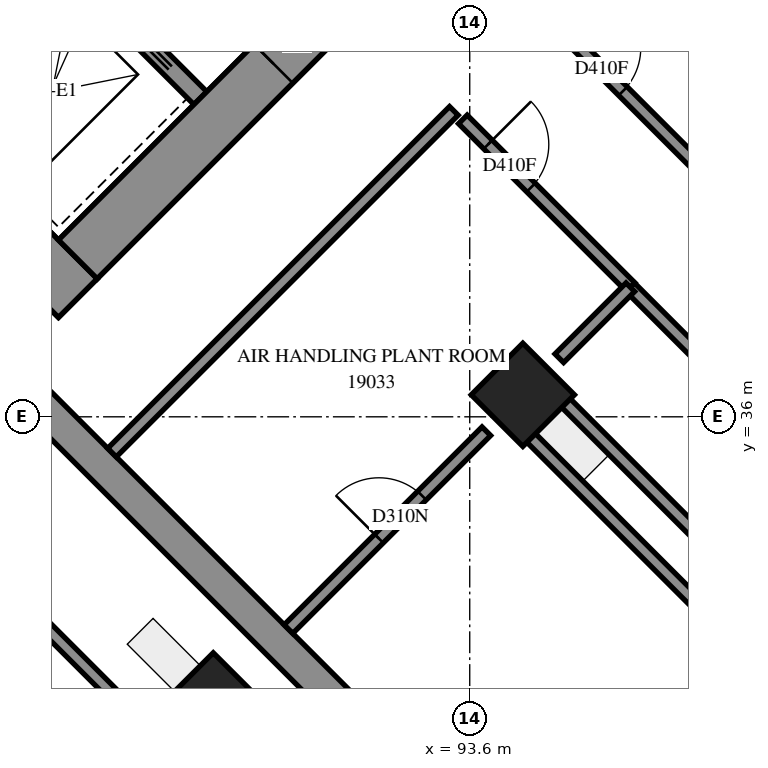
"""IFC4 building model, lengths in metres.
Left out: names, types, materials, properties, quantities, classifications, styles, units other than length and angle.
Written with IfcOpenShell. Run it as: python <this file> out.ifc"""

import sys

from ifc_helpers import new_model, si_unit, direction, frame, frame_2d, origin, origin_2d, place, context, subcontext, project, spatial, polyline, rectangle, outline, extrude, element, fill, save


model = new_model("IFC4")
c1 = context("Model", 3, precision=1e-05, world=origin(), true_north=direction((0.0, 1.0)))
c2 = subcontext(c1, "Body", "Model", "MODEL_VIEW")
j1 = project(units=[si_unit("LENGTHUNIT", "METRE"), si_unit("PLANEANGLEUNIT", "RADIAN")], contexts=[c1])
p1 = place(None, origin())
s1 = spatial("IfcSite", under=j1, at=p1, CompositionType="ELEMENT")
p2 = place(p1, origin())
s2 = spatial("IfcBuilding", under=s1, at=p2, CompositionType="ELEMENT")
p3 = place(p2, frame((0.0, 0.0, 72.0)))
s3 = spatial("IfcBuildingStorey", under=s2, at=p3, CompositionType="ELEMENT", Elevation=72.0)
p4 = place(p3, frame((94.474, 36.362, 0.0), z_axis=(0.0, 0.0, 1.0), x_axis=(0.7071067812, -0.7071067812, 0.0)))
e1 = element("IfcColumn", 1, at=p4, inside=s3, PredefinedType="COLUMN", context=c2, shape_type="SweptSolid", body=[
    extrude(rectangle(XDim=1.2, YDim=1.2, at=origin_2d()), origin(), (0.0, 0.0, 1.0), 4.7),
])
p5 = place(p3, frame((89.382, 31.271, -0.3), z_axis=(0.0, 0.0, 1.0), x_axis=(0.7071067812, -0.7071067812, 0.0)))
e2 = element("IfcColumn", 2, at=p5, inside=s3, PredefinedType="COLUMN", context=c2, shape_type="SweptSolid", body=[
    extrude(rectangle(XDim=1.2, YDim=1.2, at=origin_2d()), origin(), (0.0, 0.0, 1.0), 5.0),
])
p6 = place(p3, frame((75.7, 49.408, -0.3), z_axis=(0.0, 0.0, 1.0), x_axis=(0.7071098676, -0.7071036948, 0.0)))
e3 = element("IfcWall", 3, at=p6, inside=s3, PredefinedType="SHEAR", context=c2, shape_type="SweptSolid", body=[
    extrude(rectangle(XDim=16.2, YDim=0.9, at=frame_2d((8.1, 0.0))), origin(), (0.0, 0.0, 1.0), 4.3),
])
p7 = place(p3, frame((87.155, 38.589, -0.3), z_axis=(0.0, 0.0, 1.0), x_axis=(0.7071067812, 0.7071067812, 0.0)))
e4 = element("IfcWall", 4, at=p7, inside=s3, PredefinedType="SHEAR", context=c2, shape_type="SweptSolid", body=[
    extrude(rectangle(XDim=14.4, YDim=0.9, at=frame_2d((7.2, 0.0))), origin(), (0.0, 0.0, 1.0), 4.3),
])
p8 = place(p7, frame((4.55, 0.0, 0.3)))
e5 = element("IfcOpeningElement", 5, at=p8, cuts=e4, PredefinedType="OPENING", context=c2, shape_type="SweptSolid", body=[
    extrude(rectangle(XDim=1.1, YDim=2.1, at=frame_2d((0.55, 1.05))), frame((0.0, 0.46, 0.0), z_axis=(0.0, -1.0, 0.0), x_axis=(1.0, 0.0, 0.0)), (0.0, 0.0, 1.0), 0.92),
])
p9 = place(p7, frame((11.35, 0.0, 0.3)))
e6 = element("IfcOpeningElement", 6, at=p9, cuts=e4, PredefinedType="OPENING", context=c2, shape_type="SweptSolid", body=[
    extrude(rectangle(XDim=1.1, YDim=2.1, at=frame_2d((0.55, 1.05))), frame((0.0, 0.46, 0.0), z_axis=(0.0, -1.0, 0.0), x_axis=(1.0, 0.0, 0.0)), (0.0, 0.0, 1.0), 0.92),
])
p10 = place(p3, frame((78.988, 51.423, 0.0), z_axis=(0.0, 0.0, 1.0), x_axis=(0.7071067812, -0.7071067812, 0.0)))
e7 = element("IfcWall", 7, at=p10, inside=s3, PredefinedType="SOLIDWALL", context=c2, shape_type="SweptSolid", body=[
    extrude(rectangle(XDim=14.4, YDim=0.3, at=frame_2d((7.2, 0.0))), origin(), (0.0, 0.0, 1.0), 4.7),
])
p11 = place(p10, frame((1.25, 0.0, 0.0)))
e8 = element("IfcOpeningElement", 8, at=p11, cuts=e7, PredefinedType="OPENING", context=c2, shape_type="SweptSolid", body=[
    extrude(rectangle(XDim=1.1, YDim=2.1, at=frame_2d((0.55, 1.05))), frame((0.0, 0.16, 0.0), z_axis=(0.0, -1.0, 0.0), x_axis=(1.0, 0.0, 0.0)), (0.0, 0.0, 1.0), 0.32),
])
p12 = place(p10, frame((4.85, 0.0, 0.0)))
e9 = element("IfcOpeningElement", 9, at=p12, cuts=e7, PredefinedType="OPENING", context=c2, shape_type="SweptSolid", body=[
    extrude(rectangle(XDim=1.1, YDim=2.1, at=frame_2d((0.55, 1.05))), frame((0.0, 0.16, 0.0), z_axis=(0.0, -1.0, 0.0), x_axis=(1.0, 0.0, 0.0)), (0.0, 0.0, 1.0), 0.32),
])
p13 = place(p10, frame((8.45, 0.0, 0.0)))
e10 = element("IfcOpeningElement", 10, at=p13, cuts=e7, PredefinedType="OPENING", context=c2, shape_type="SweptSolid", body=[
    extrude(rectangle(XDim=1.1, YDim=2.1, at=frame_2d((0.55, 1.05))), frame((0.0, 0.16, 0.0), z_axis=(0.0, -1.0, 0.0), x_axis=(1.0, 0.0, 0.0)), (0.0, 0.0, 1.0), 0.32),
])
p14 = place(p10, frame((12.05, 0.0, 0.0)))
e11 = element("IfcOpeningElement", 11, at=p14, cuts=e7, PredefinedType="OPENING", context=c2, shape_type="SweptSolid", body=[
    extrude(rectangle(XDim=1.1, YDim=2.1, at=frame_2d((0.55, 1.05))), frame((0.0, 0.16, 0.0), z_axis=(0.0, -1.0, 0.0), x_axis=(1.0, 0.0, 0.0)), (0.0, 0.0, 1.0), 0.32),
])
p15 = place(p3, frame((111.055, 38.059, 0.0), z_axis=(0.0, 0.0, 1.0), x_axis=(-0.7071078702, 0.7071056922, 0.0)))
e12 = element("IfcWall", 12, at=p15, inside=s3, PredefinedType="SOLIDWALL", context=c2, shape_type="SweptSolid", body=[
    extrude(outline(polyline([(-0.275, -0.275), (46.028, -0.275), (45.8, 0.275), (0.275, 0.275), (-0.275, -0.275)])), origin(), (0.0, 0.0, 1.0), 4.7),
])
p16 = place(p3, frame((78.064, 44.675, 0.0), z_axis=(0.0, 0.0, 1.0), x_axis=(0.7071084256, -0.7071051368, 0.0)))
e13 = element("IfcWall", 13, at=p16, inside=s3, PredefinedType="SOLIDWALL", context=c2, shape_type="SweptSolid", body=[
    extrude(outline(polyline([(0.114, -0.275), (30.682, -0.275), (30.132, 0.275), (-0.114, 0.275), (0.114, -0.275)])), origin(), (0.0, 0.0, 1.0), 4.7),
])
p17 = place(p16, frame((3.982, 0.0, 0.9)))
e14 = element("IfcOpeningElement", 14, at=p17, cuts=e13, PredefinedType="OPENING", context=c2, shape_type="SweptSolid", body=[
    extrude(rectangle(XDim=1.8, YDim=2.4, at=frame_2d((0.9, 1.2))), frame((0.0, 0.285, 0.0), z_axis=(0.0, -1.0, 0.0), x_axis=(1.0, 0.0, 0.0)), (0.0, 0.0, 1.0), 0.57),
])
p18 = place(p16, frame((7.582, 0.0, 0.9)))
e15 = element("IfcOpeningElement", 15, at=p18, cuts=e13, PredefinedType="OPENING", context=c2, shape_type="SweptSolid", body=[
    extrude(rectangle(XDim=1.8, YDim=2.4, at=frame_2d((0.9, 1.2))), frame((0.0, 0.285, 0.0), z_axis=(0.0, -1.0, 0.0), x_axis=(1.0, 0.0, 0.0)), (0.0, 0.0, 1.0), 0.57),
])
p19 = place(p3, frame((112.929, 39.756, 0.0), z_axis=(0.0, 0.0, 1.0), x_axis=(-0.7071067812, 0.7071067812, 0.0)))
e16 = element("IfcWall", 16, at=p19, inside=s3, PredefinedType="SOLIDWALL", context=c2, shape_type="SweptSolid", body=[
    extrude(outline(polyline([(-0.1, -0.1), (47.126, -0.1), (47.044, 0.1), (0.1, 0.1), (-0.1, -0.1)])), origin(), (0.0, 0.0, 1.0), 4.7),
])
p20 = place(p3, frame((77.018, 42.15, 0.0), z_axis=(0.0, 0.0, 1.0), x_axis=(0.7071067812, -0.7071067812, 0.0)))
e17 = element("IfcWall", 17, at=p20, inside=s3, PredefinedType="SOLIDWALL", context=c2, shape_type="SweptSolid", body=[
    extrude(outline(polyline([(0.041, -0.1), (31.986, -0.1), (31.786, 0.1), (-0.041, 0.1), (0.041, -0.1)])), origin(), (0.0, 0.0, 1.0), 4.7),
])
p21 = place(p3, frame((94.895, 42.581, 0.0), z_axis=(0.0, 0.0, 1.0), x_axis=(0.707103796, -0.7071097663, 0.0)))
e18 = element("IfcWall", 18, at=p21, inside=s3, PredefinedType="PARTITIONING", context=c2, shape_type="SweptSolid", body=[
    extrude(rectangle(XDim=16.75, YDim=0.2, at=frame_2d((8.375, 0.0))), origin(), (0.0, 0.0, 1.0), 4.7),
])
p22 = place(p21, frame((0.732, 0.0, 0.0)))
e19 = element("IfcOpeningElement", 19, at=p22, cuts=e18, PredefinedType="OPENING", context=c2, shape_type="SweptSolid", body=[
    extrude(rectangle(XDim=1.0, YDim=2.1, at=frame_2d((0.5, 1.05))), frame((0.0, 0.11, 0.0), z_axis=(0.0, -1.0, 0.0), x_axis=(1.0, 0.0, 0.0)), (0.0, 0.0, 1.0), 0.22),
])
p23 = place(p21, frame((10.103, 0.0, 0.0)))
e20 = element("IfcOpeningElement", 20, at=p23, cuts=e18, PredefinedType="OPENING", context=c2, shape_type="SweptSolid", body=[
    extrude(rectangle(XDim=1.0, YDim=2.1, at=frame_2d((0.5, 1.05))), frame((0.0, 0.11, 0.0), z_axis=(0.0, -1.0, 0.0), x_axis=(1.0, 0.0, 0.0)), (0.0, 0.0, 1.0), 0.22),
])
p24 = place(p21, frame((14.32, 0.0, 0.0)))
e21 = element("IfcOpeningElement", 21, at=p24, cuts=e18, PredefinedType="OPENING", context=c2, shape_type="SweptSolid", body=[
    extrude(rectangle(XDim=1.0, YDim=2.1, at=frame_2d((0.5, 1.05))), frame((0.0, 0.11, 0.0), z_axis=(0.0, -1.0, 0.0), x_axis=(1.0, 0.0, 0.0)), (0.0, 0.0, 1.0), 0.22),
])
p25 = place(p3, frame((87.717, 35.411, 0.0), z_axis=(0.0, 0.0, 1.0), x_axis=(0.7072325651, 0.7069809749, 0.0)))
e22 = element("IfcWall", 22, at=p25, inside=s3, PredefinedType="PARTITIONING", context=c2, shape_type="SweptSolid", body=[
    extrude(rectangle(XDim=7.949, YDim=0.2, at=frame_2d((3.975, 0.0))), origin(), (0.0, 0.0, 1.0), 4.7),
])
p26 = place(p3, frame((95.077, 36.331, 0.0), z_axis=(0.0, 0.0, 1.0), x_axis=(0.7071067812, -0.7071067812, 0.0)))
e23 = element("IfcWall", 23, at=p26, inside=s3, PredefinedType="PARTITIONING", context=c2, shape_type="SweptSolid", body=[
    extrude(rectangle(XDim=6.305, YDim=0.2, at=frame_2d((3.152, 0.0))), origin(), (0.0, 0.0, 1.0), 4.7),
])
p27 = place(p3, frame((94.505, 35.759, 0.0), z_axis=(0.0, 0.0, 1.0), x_axis=(0.7071067812, -0.7071067812, 0.0)))
e24 = element("IfcWall", 24, at=p27, inside=s3, PredefinedType="PARTITIONING", context=c2, shape_type="SweptSolid", body=[
    extrude(rectangle(XDim=6.302, YDim=0.2, at=frame_2d((3.151, 0.0))), origin(), (0.0, 0.0, 1.0), 4.7),
])
p28 = place(p3, frame((90.619, 32.509, 0.0), z_axis=(0.0, 0.0, 1.0), x_axis=(0.7070959161, 0.7071176461, 0.0)))
e25 = element("IfcWall", 25, at=p28, inside=s3, PredefinedType="PARTITIONING", context=c2, shape_type="SweptSolid", body=[
    extrude(rectangle(XDim=4.602, YDim=0.2, at=frame_2d((2.301, 0.0))), origin(), (0.0, 0.0, 1.0), 4.7),
])
p29 = place(p28, frame((2.105, 0.0, 0.0)))
e26 = element("IfcOpeningElement", 26, at=p29, cuts=e25, PredefinedType="OPENING", context=c2, shape_type="SweptSolid", body=[
    extrude(rectangle(XDim=1.0, YDim=2.1, at=frame_2d((0.5, 1.05))), frame((0.0, 0.11, 0.0), z_axis=(0.0, -1.0, 0.0), x_axis=(1.0, 0.0, 0.0)), (0.0, 0.0, 1.0), 0.22),
])
p30 = place(p3, frame((93.487, 40.891, 0.0), z_axis=(0.0, 0.0, 1.0), x_axis=(0.7071067812, -0.7071067812, 0.0)))
e27 = element("IfcWall", 27, at=p30, inside=s3, PredefinedType="PARTITIONING", context=c2, shape_type="SweptSolid", body=[
    extrude(rectangle(XDim=3.9, YDim=0.2, at=frame_2d((1.95, 0.0))), origin(), (0.0, 0.0, 1.0), 4.7),
])
p31 = place(p30, frame((0.584, 0.0, 0.0)))
e28 = element("IfcOpeningElement", 28, at=p31, cuts=e27, PredefinedType="OPENING", context=c2, shape_type="SweptSolid", body=[
    extrude(rectangle(XDim=1.0, YDim=2.1, at=frame_2d((0.5, 1.05))), frame((0.0, 0.11, 0.0), z_axis=(0.0, -1.0, 0.0), x_axis=(1.0, 0.0, 0.0)), (0.0, 0.0, 1.0), 0.22),
])
p32 = place(p3, frame((96.241, 38.129, 0.0), z_axis=(0.0, 0.0, 1.0), x_axis=(0.7068288851, -0.7073845681, 0.0)))
e29 = element("IfcWall", 29, at=p32, inside=s3, PredefinedType="PARTITIONING", context=c2, shape_type="SweptSolid", body=[
    extrude(rectangle(XDim=3.599, YDim=0.2, at=frame_2d((1.8, 0.0))), origin(), (0.0, 0.0, 1.0), 4.7),
])
p33 = place(p3, frame((95.073, 36.963, 0.0), z_axis=(0.0, 0.0, 1.0), x_axis=(0.7071067812, 0.7071067812, 0.0)))
e30 = element("IfcWall", 30, at=p33, inside=s3, PredefinedType="PARTITIONING", context=c2, shape_type="SweptSolid", body=[
    extrude(rectangle(XDim=1.652, YDim=0.2, at=frame_2d((0.826, 0.0))), origin(), (0.0, 0.0, 1.0), 4.7),
])
p34 = place(p8, origin())
e31 = element("IfcDoor", 31, at=p34, inside=s3, OperationType="DOUBLE_DOOR_SINGLE_SWING", PredefinedType="DOOR", context=c2, shape_type="SweptSolid", body=[
    extrude(rectangle(XDim=1.1, YDim=2.1, at=frame_2d((0.55, 1.05))), frame((0.0, 0.025, 0.0), z_axis=(0.0, -1.0, 0.0), x_axis=(1.0, 0.0, 0.0)), (0.0, 0.0, 1.0), 0.05),
])
fill(e5, e31)
p35 = place(p22, origin())
e32 = element("IfcDoor", 32, at=p35, inside=s3, OperationType="SINGLE_SWING_RIGHT", PredefinedType="DOOR", context=c2, shape_type="SweptSolid", body=[
    extrude(rectangle(XDim=1.0, YDim=2.1, at=frame_2d((0.5, 1.05))), frame((0.0, 0.025, 0.0), z_axis=(0.0, -1.0, 0.0), x_axis=(1.0, 0.0, 0.0)), (0.0, 0.0, 1.0), 0.05),
])
fill(e19, e32)
p36 = place(p31, origin())
e33 = element("IfcDoor", 33, at=p36, inside=s3, OperationType="SINGLE_SWING_LEFT", PredefinedType="DOOR", context=c2, shape_type="SweptSolid", body=[
    extrude(rectangle(XDim=1.0, YDim=2.1, at=frame_2d((0.5, 1.05))), frame((0.0, 0.025, 0.0), z_axis=(0.0, -1.0, 0.0), x_axis=(1.0, 0.0, 0.0)), (0.0, 0.0, 1.0), 0.05),
])
fill(e28, e33)
p37 = place(p29, origin())
e34 = element("IfcDoor", 34, at=p37, inside=s3, OperationType="SINGLE_SWING_LEFT", PredefinedType="DOOR", context=c2, shape_type="SweptSolid", body=[
    extrude(rectangle(XDim=1.0, YDim=2.1, at=frame_2d((0.5, 1.05))), frame((0.0, 0.025, 0.0), z_axis=(0.0, -1.0, 0.0), x_axis=(1.0, 0.0, 0.0)), (0.0, 0.0, 1.0), 0.05),
])
fill(e26, e34)
save(model, sys.argv[1])
